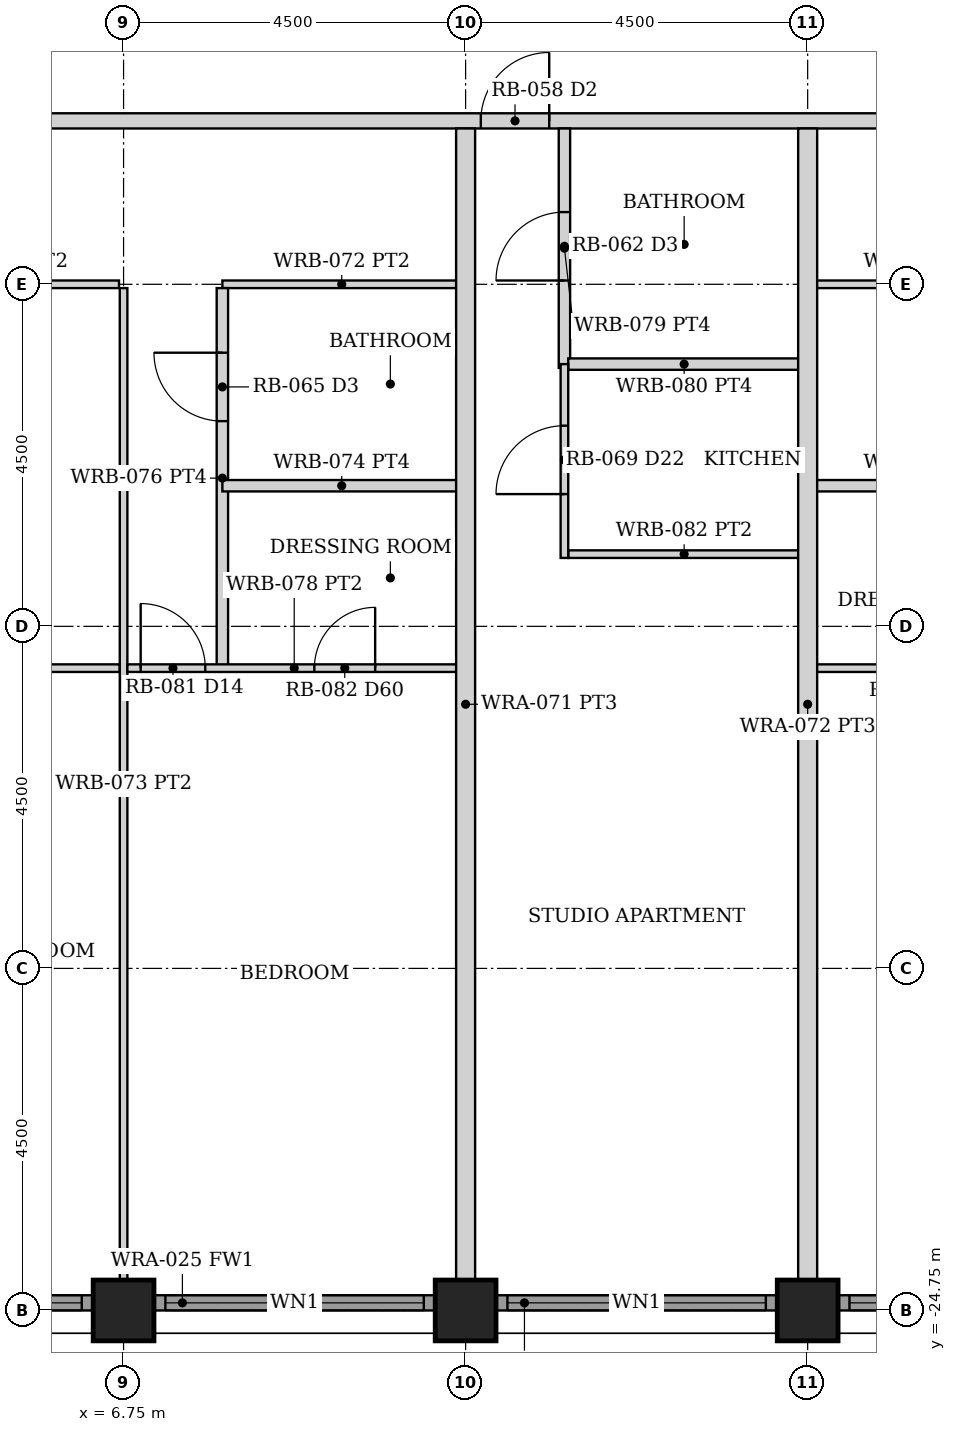
"""IFC4 building model, lengths in metres.
Left out: names, types, materials, properties, quantities, classifications, styles, units other than length and angle.
Written with IfcOpenShell. Run it as: python <this file> out.ifc"""

import sys

from ifc_helpers import new_model, si_unit, direction, frame, frame_2d, origin, origin_2d, place, context, subcontext, project, spatial, rectangle, hollow_rectangle, extrude, element, fill, save


model = new_model("IFC4")
c1 = context("Model", 3, precision=1e-05, world=origin(), true_north=direction((0.0, 1.0)))
c2 = subcontext(c1, "Body", "Model", "MODEL_VIEW")
j1 = project(units=[si_unit("LENGTHUNIT", "METRE"), si_unit("PLANEANGLEUNIT", "RADIAN")], contexts=[c1])
p1 = place(None, origin())
s1 = spatial("IfcSite", under=j1, at=p1, CompositionType="ELEMENT")
p2 = place(p1, origin())
s2 = spatial("IfcBuilding", under=s1, at=p2, CompositionType="ELEMENT")
p3 = place(p2, frame((0.0, 0.0, 37.0)))
s3 = spatial("IfcBuildingStorey", under=s2, at=p3, CompositionType="ELEMENT", Elevation=37.0)
for number, where, z_axis, x_axis in (
    (1, (6.75, -24.75, 0.0), (0.0, 0.0, 1.0), (0.0, 1.0, 0.0)),
    (2, (11.25, -24.75, 0.0), (0.0, 0.0, 1.0), (0.0, 1.0, 0.0)),
    (3, (15.75, -24.75, 0.0), (0.0, 0.0, 1.0), (0.0, 1.0, 0.0)),
):
    element("IfcColumn", number, at=place(p3, frame(where, z_axis=z_axis, x_axis=x_axis)), inside=s3, PredefinedType="COLUMN", context=c2, shape_type="SweptSolid", body=[
        extrude(hollow_rectangle(XDim=0.8, YDim=0.8, WallThickness=0.07, at=origin_2d()), origin(), (0.0, 0.0, 1.0), 3.5),
    ])
p4 = place(p3, frame((2.655, -24.65, 0.0), z_axis=(0.0, 0.0, 1.0), x_axis=(1.0, 0.0, 0.0)))
e4 = element("IfcWall", 4, at=p4, inside=s3, PredefinedType="SOLIDWALL", context=c2, shape_type="SweptSolid", body=[
    extrude(rectangle(XDim=3.69, YDim=0.2, at=frame_2d((1.845, 0.0))), origin(), (0.0, 0.0, 1.0), 2.379),
])
p5 = place(p4, frame((0.145, 0.0, 0.3)))
e5 = element("IfcOpeningElement", 5, at=p5, cuts=e4, PredefinedType="OPENING", context=c2, shape_type="SweptSolid", body=[
    extrude(rectangle(XDim=3.4, YDim=1.929, at=frame_2d((1.7, 0.964))), frame((0.0, 0.11, 0.0), z_axis=(0.0, -1.0, 0.0), x_axis=(1.0, 0.0, 0.0)), (0.0, 0.0, 1.0), 0.22),
])
p6 = place(p3, frame((7.155, -24.65, 0.0), z_axis=(0.0, 0.0, 1.0), x_axis=(1.0, 0.0, 0.0)))
e6 = element("IfcWall", 6, at=p6, inside=s3, PredefinedType="SOLIDWALL", context=c2, shape_type="SweptSolid", body=[
    extrude(rectangle(XDim=3.69, YDim=0.2, at=frame_2d((1.845, 0.0))), origin(), (0.0, 0.0, 1.0), 2.379),
])
p7 = place(p6, frame((0.145, 0.0, 0.3)))
e7 = element("IfcOpeningElement", 7, at=p7, cuts=e6, PredefinedType="OPENING", context=c2, shape_type="SweptSolid", body=[
    extrude(rectangle(XDim=3.4, YDim=1.929, at=frame_2d((1.7, 0.964))), frame((0.0, 0.11, 0.0), z_axis=(0.0, -1.0, 0.0), x_axis=(1.0, 0.0, 0.0)), (0.0, 0.0, 1.0), 0.22),
])
p8 = place(p3, frame((11.655, -24.65, 0.0), z_axis=(0.0, 0.0, 1.0), x_axis=(1.0, 0.0, 0.0)))
e8 = element("IfcWall", 8, at=p8, inside=s3, PredefinedType="SOLIDWALL", context=c2, shape_type="SweptSolid", body=[
    extrude(rectangle(XDim=3.69, YDim=0.2, at=frame_2d((1.845, 0.0))), origin(), (0.0, 0.0, 1.0), 2.379),
])
p9 = place(p8, frame((0.145, 0.0, 0.3)))
e9 = element("IfcOpeningElement", 9, at=p9, cuts=e8, PredefinedType="OPENING", context=c2, shape_type="SweptSolid", body=[
    extrude(rectangle(XDim=3.4, YDim=1.929, at=frame_2d((1.7, 0.964))), frame((0.0, 0.11, 0.0), z_axis=(0.0, -1.0, 0.0), x_axis=(1.0, 0.0, 0.0)), (0.0, 0.0, 1.0), 0.22),
])
p10 = place(p3, frame((16.155, -24.65, 0.0), z_axis=(0.0, 0.0, 1.0), x_axis=(1.0, 0.0, 0.0)))
e10 = element("IfcWall", 10, at=p10, inside=s3, PredefinedType="SOLIDWALL", context=c2, shape_type="SweptSolid", body=[
    extrude(rectangle(XDim=3.69, YDim=0.2, at=frame_2d((1.845, 0.0))), origin(), (0.0, 0.0, 1.0), 2.379),
])
p11 = place(p10, frame((0.145, 0.0, 0.3)))
e11 = element("IfcOpeningElement", 11, at=p11, cuts=e10, PredefinedType="OPENING", context=c2, shape_type="SweptSolid", body=[
    extrude(rectangle(XDim=3.4, YDim=1.929, at=frame_2d((1.7, 0.964))), frame((0.0, 0.11, 0.0), z_axis=(0.0, -1.0, 0.0), x_axis=(1.0, 0.0, 0.0)), (0.0, 0.0, 1.0), 0.22),
])
p12 = place(p3, frame((-24.55, -9.1, 0.0), z_axis=(0.0, 0.0, 1.0), x_axis=(1.0, 0.0, 0.0)))
e12 = element("IfcWall", 12, at=p12, inside=s3, PredefinedType="PARTITIONING", context=c2, shape_type="SweptSolid", body=[
    extrude(rectangle(XDim=49.1, YDim=0.2, at=frame_2d((24.55, 0.0))), origin(), (0.0, 0.0, 1.0), 2.373),
])
p13 = place(p12, frame((5.1, 0.0, 0.0)))
e13 = element("IfcOpeningElement", 13, at=p13, cuts=e12, PredefinedType="OPENING", context=c2, shape_type="SweptSolid", body=[
    extrude(rectangle(XDim=0.9, YDim=2.1, at=frame_2d((0.45, 1.05))), frame((0.0, 0.11, 0.0), z_axis=(0.0, -1.0, 0.0), x_axis=(1.0, 0.0, 0.0)), (0.0, 0.0, 1.0), 0.22),
])
p14 = place(p12, frame((9.0, 0.0, 0.0)))
e14 = element("IfcOpeningElement", 14, at=p14, cuts=e12, PredefinedType="OPENING", context=c2, shape_type="SweptSolid", body=[
    extrude(rectangle(XDim=0.9, YDim=2.1, at=frame_2d((0.45, 1.05))), frame((0.0, 0.11, 0.0), z_axis=(0.0, -1.0, 0.0), x_axis=(1.0, 0.0, 0.0)), (0.0, 0.0, 1.0), 0.22),
])
p15 = place(p12, frame((18.1, 0.0, 0.0)))
e15 = element("IfcOpeningElement", 15, at=p15, cuts=e12, PredefinedType="OPENING", context=c2, shape_type="SweptSolid", body=[
    extrude(rectangle(XDim=0.9, YDim=2.1, at=frame_2d((0.45, 1.05))), frame((0.0, 0.11, 0.0), z_axis=(0.0, -1.0, 0.0), x_axis=(1.0, 0.0, 0.0)), (0.0, 0.0, 1.0), 0.22),
])
p16 = place(p12, frame((22.5, 0.0, 0.0)))
e16 = element("IfcOpeningElement", 16, at=p16, cuts=e12, PredefinedType="OPENING", context=c2, shape_type="SweptSolid", body=[
    extrude(rectangle(XDim=0.9, YDim=2.1, at=frame_2d((0.45, 1.05))), frame((0.0, 0.11, 0.0), z_axis=(0.0, -1.0, 0.0), x_axis=(1.0, 0.0, 0.0)), (0.0, 0.0, 1.0), 0.22),
])
p17 = place(p12, frame((27.1, 0.0, 0.0)))
e17 = element("IfcOpeningElement", 17, at=p17, cuts=e12, PredefinedType="OPENING", context=c2, shape_type="SweptSolid", body=[
    extrude(rectangle(XDim=0.9, YDim=2.1, at=frame_2d((0.45, 1.05))), frame((0.0, 0.11, 0.0), z_axis=(0.0, -1.0, 0.0), x_axis=(1.0, 0.0, 0.0)), (0.0, 0.0, 1.0), 0.22),
])
p18 = place(p12, frame((36.0, 0.0, 0.0)))
e18 = element("IfcOpeningElement", 18, at=p18, cuts=e12, PredefinedType="OPENING", context=c2, shape_type="SweptSolid", body=[
    extrude(rectangle(XDim=0.9, YDim=2.1, at=frame_2d((0.45, 1.05))), frame((0.0, 0.11, 0.0), z_axis=(0.0, -1.0, 0.0), x_axis=(1.0, 0.0, 0.0)), (0.0, 0.0, 1.0), 0.22),
])
p19 = place(p12, frame((43.1, 0.0, 0.0)))
e19 = element("IfcOpeningElement", 19, at=p19, cuts=e12, PredefinedType="OPENING", context=c2, shape_type="SweptSolid", body=[
    extrude(rectangle(XDim=0.9, YDim=2.1, at=frame_2d((0.45, 1.05))), frame((0.0, 0.11, 0.0), z_axis=(0.0, -1.0, 0.0), x_axis=(1.0, 0.0, 0.0)), (0.0, 0.0, 1.0), 0.22),
])
p20 = place(p3, frame((3.55, -11.25, 0.0), z_axis=(0.0, 0.0, 1.0), x_axis=(1.0, 0.0, 0.0)))
e20 = element("IfcWall", 20, at=p20, inside=s3, PredefinedType="PARTITIONING", context=c2, shape_type="SweptSolid", body=[
    extrude(rectangle(XDim=3.14, YDim=0.1, at=frame_2d((1.57, 0.0))), origin(), (0.0, 0.0, 1.0), 2.373),
])
p21 = place(p3, frame((2.31, -16.3, 0.0), z_axis=(0.0, 0.0, 1.0), x_axis=(1.0, 0.0, 0.0)))
e21 = element("IfcWall", 21, at=p21, inside=s3, PredefinedType="PARTITIONING", context=c2, shape_type="SweptSolid", body=[
    extrude(rectangle(XDim=4.39, YDim=0.1, at=frame_2d((2.195, 0.0))), origin(), (0.0, 0.0, 1.0), 2.373),
])
p22 = place(p21, frame((0.14, 0.0, 0.0)))
e22 = element("IfcOpeningElement", 22, at=p22, cuts=e21, PredefinedType="OPENING", context=c2, shape_type="SweptSolid", body=[
    extrude(rectangle(XDim=0.9, YDim=2.1, at=frame_2d((0.45, 1.05))), frame((0.0, 0.06, 0.0), z_axis=(0.0, -1.0, 0.0), x_axis=(1.0, 0.0, 0.0)), (0.0, 0.0, 1.0), 0.12),
])
p23 = place(p3, frame((6.75, -24.35, 0.0), z_axis=(0.0, 0.0, 1.0), x_axis=(0.0, 1.0, 0.0)))
e23 = element("IfcWall", 23, at=p23, inside=s3, PredefinedType="PARTITIONING", context=c2, shape_type="SweptSolid", body=[
    extrude(rectangle(XDim=13.05, YDim=0.1, at=frame_2d((6.525, 0.0))), origin(), (0.0, 0.0, 1.0), 2.373),
])
p24 = place(p3, frame((8.05, -11.25, 0.0), z_axis=(0.0, 0.0, 1.0), x_axis=(1.0, 0.0, 0.0)))
e24 = element("IfcWall", 24, at=p24, inside=s3, PredefinedType="PARTITIONING", context=c2, shape_type="SweptSolid", body=[
    extrude(rectangle(XDim=3.14, YDim=0.1, at=frame_2d((1.57, 0.0))), origin(), (0.0, 0.0, 1.0), 2.373),
])
p25 = place(p3, frame((8.05, -16.3, 0.0), z_axis=(0.0, 0.0, 1.0), x_axis=(0.0, 1.0, 0.0)))
e25 = element("IfcWall", 25, at=p25, inside=s3, PredefinedType="PARTITIONING", context=c2, shape_type="SweptSolid", body=[
    extrude(rectangle(XDim=5.0, YDim=0.15, at=frame_2d((2.5, 0.0))), origin(), (0.0, 0.0, 1.0), 2.373),
])
p26 = place(p25, frame((3.25, 0.0, 0.0)))
e26 = element("IfcOpeningElement", 26, at=p26, cuts=e25, PredefinedType="OPENING", context=c2, shape_type="SweptSolid", body=[
    extrude(rectangle(XDim=0.9, YDim=2.1, at=frame_2d((0.45, 1.05))), frame((0.0, 0.085, 0.0), z_axis=(0.0, -1.0, 0.0), x_axis=(1.0, 0.0, 0.0)), (0.0, 0.0, 1.0), 0.17),
])
p27 = place(p3, frame((6.8, -16.3, 0.0), z_axis=(0.0, 0.0, 1.0), x_axis=(1.0, 0.0, 0.0)))
e27 = element("IfcWall", 27, at=p27, inside=s3, PredefinedType="PARTITIONING", context=c2, shape_type="SweptSolid", body=[
    extrude(rectangle(XDim=4.39, YDim=0.1, at=frame_2d((2.195, 0.0))), origin(), (0.0, 0.0, 1.0), 2.373),
])
p28 = place(p27, frame((0.175, 0.0, 0.0)))
e28 = element("IfcOpeningElement", 28, at=p28, cuts=e27, PredefinedType="OPENING", context=c2, shape_type="SweptSolid", body=[
    extrude(rectangle(XDim=0.85, YDim=2.1, at=frame_2d((0.425, 1.05))), frame((0.0, 0.06, 0.0), z_axis=(0.0, -1.0, 0.0), x_axis=(1.0, 0.0, 0.0)), (0.0, 0.0, 1.0), 0.12),
])
p29 = place(p27, frame((2.46, 0.0, 0.0)))
e29 = element("IfcOpeningElement", 29, at=p29, cuts=e27, PredefinedType="OPENING", context=c2, shape_type="SweptSolid", body=[
    extrude(rectangle(XDim=0.8, YDim=2.1, at=frame_2d((0.4, 1.05))), frame((0.0, 0.06, 0.0), z_axis=(0.0, -1.0, 0.0), x_axis=(1.0, 0.0, 0.0)), (0.0, 0.0, 1.0), 0.12),
])
p30 = place(p3, frame((8.05, -13.9, 0.0), z_axis=(0.0, 0.0, 1.0), x_axis=(1.0, 0.0, 0.0)))
e30 = element("IfcWall", 30, at=p30, inside=s3, PredefinedType="PARTITIONING", context=c2, shape_type="SweptSolid", body=[
    extrude(rectangle(XDim=3.14, YDim=0.15, at=frame_2d((1.57, 0.0))), origin(), (0.0, 0.0, 1.0), 2.373),
])
p31 = place(p3, frame((12.55, -12.35, 0.0), z_axis=(0.0, 0.0, 1.0), x_axis=(0.0, 1.0, 0.0)))
e31 = element("IfcWall", 31, at=p31, inside=s3, PredefinedType="PARTITIONING", context=c2, shape_type="SweptSolid", body=[
    extrude(rectangle(XDim=3.15, YDim=0.15, at=frame_2d((1.575, 0.0))), origin(), (0.0, 0.0, 1.0), 2.373),
])
p32 = place(p31, frame((1.15, 0.0, 0.0)))
e32 = element("IfcOpeningElement", 32, at=p32, cuts=e31, PredefinedType="OPENING", context=c2, shape_type="SweptSolid", body=[
    extrude(rectangle(XDim=0.9, YDim=2.1, at=frame_2d((0.45, 1.05))), frame((0.0, 0.085, 0.0), z_axis=(0.0, -1.0, 0.0), x_axis=(1.0, 0.0, 0.0)), (0.0, 0.0, 1.0), 0.17),
])
p33 = place(p3, frame((12.6, -12.3, 0.0), z_axis=(0.0, 0.0, 1.0), x_axis=(1.0, 0.0, 0.0)))
e33 = element("IfcWall", 33, at=p33, inside=s3, PredefinedType="PARTITIONING", context=c2, shape_type="SweptSolid", body=[
    extrude(rectangle(XDim=3.05, YDim=0.15, at=frame_2d((1.525, 0.0))), origin(), (0.0, 0.0, 1.0), 2.373),
])
p34 = place(p3, frame((12.6, -14.8, 0.0), z_axis=(0.0, 0.0, 1.0), x_axis=(1.0, 0.0, 0.0)))
e34 = element("IfcWall", 34, at=p34, inside=s3, PredefinedType="PARTITIONING", context=c2, shape_type="SweptSolid", body=[
    extrude(rectangle(XDim=3.05, YDim=0.1, at=frame_2d((1.525, 0.0))), origin(), (0.0, 0.0, 1.0), 2.373),
])
p35 = place(p3, frame((12.55, -14.85, 0.0), z_axis=(0.0, 0.0, 1.0), x_axis=(0.0, 1.0, 0.0)))
e35 = element("IfcWall", 35, at=p35, inside=s3, PredefinedType="PARTITIONING", context=c2, shape_type="SweptSolid", body=[
    extrude(rectangle(XDim=2.55, YDim=0.1, at=frame_2d((1.275, 0.0))), origin(), (0.0, 0.0, 1.0), 2.373),
])
p36 = place(p35, frame((0.84, 0.0, 0.0)))
e36 = element("IfcOpeningElement", 36, at=p36, cuts=e35, PredefinedType="OPENING", context=c2, shape_type="SweptSolid", body=[
    extrude(rectangle(XDim=0.9, YDim=2.1, at=frame_2d((0.45, 1.05))), frame((0.0, 0.06, 0.0), z_axis=(0.0, -1.0, 0.0), x_axis=(1.0, 0.0, 0.0)), (0.0, 0.0, 1.0), 0.12),
])
p37 = place(p3, frame((15.81, -11.25, 0.0), z_axis=(0.0, 0.0, 1.0), x_axis=(1.0, 0.0, 0.0)))
e37 = element("IfcWall", 37, at=p37, inside=s3, PredefinedType="PARTITIONING", context=c2, shape_type="SweptSolid", body=[
    extrude(rectangle(XDim=3.14, YDim=0.1, at=frame_2d((1.57, 0.0))), origin(), (0.0, 0.0, 1.0), 2.373),
])
p38 = place(p3, frame((15.81, -16.3, 0.0), z_axis=(0.0, 0.0, 1.0), x_axis=(1.0, 0.0, 0.0)))
e38 = element("IfcWall", 38, at=p38, inside=s3, PredefinedType="PARTITIONING", context=c2, shape_type="SweptSolid", body=[
    extrude(rectangle(XDim=4.39, YDim=0.1, at=frame_2d((2.195, 0.0))), origin(), (0.0, 0.0, 1.0), 2.373),
])
p39 = place(p38, frame((3.365, 0.0, 0.0)))
e39 = element("IfcOpeningElement", 39, at=p39, cuts=e38, PredefinedType="OPENING", context=c2, shape_type="SweptSolid", body=[
    extrude(rectangle(XDim=0.85, YDim=2.1, at=frame_2d((0.425, 1.05))), frame((0.0, 0.06, 0.0), z_axis=(0.0, -1.0, 0.0), x_axis=(1.0, 0.0, 0.0)), (0.0, 0.0, 1.0), 0.12),
])
p40 = place(p38, frame((1.13, 0.0, 0.0)))
e40 = element("IfcOpeningElement", 40, at=p40, cuts=e38, PredefinedType="OPENING", context=c2, shape_type="SweptSolid", body=[
    extrude(rectangle(XDim=0.8, YDim=2.1, at=frame_2d((0.4, 1.05))), frame((0.0, 0.06, 0.0), z_axis=(0.0, -1.0, 0.0), x_axis=(1.0, 0.0, 0.0)), (0.0, 0.0, 1.0), 0.12),
])
p41 = place(p3, frame((15.81, -13.9, 0.0), z_axis=(0.0, 0.0, 1.0), x_axis=(1.0, 0.0, 0.0)))
e41 = element("IfcWall", 41, at=p41, inside=s3, PredefinedType="PARTITIONING", context=c2, shape_type="SweptSolid", body=[
    extrude(rectangle(XDim=3.14, YDim=0.15, at=frame_2d((1.57, 0.0))), origin(), (0.0, 0.0, 1.0), 2.373),
])
for number, where, z_axis, x_axis in (
    (42, (11.25, -24.35, 0.0), (0.0, 0.0, 1.0), (0.0, 1.0, 0.0)),
    (43, (15.75, -24.35, 0.0), (0.0, 0.0, 1.0), (0.0, 1.0, 0.0)),
):
    element("IfcWall", number, at=place(p3, frame(where, z_axis=z_axis, x_axis=x_axis)), inside=s3, PredefinedType="PARTITIONING", context=c2, shape_type="SweptSolid", body=[
        extrude(rectangle(XDim=15.15, YDim=0.25, at=frame_2d((7.575, 0.0))), origin(), (0.0, 0.0, 1.0), 2.373),
    ])
p42 = place(p5, origin())
e44 = element("IfcWindow", 44, at=p42, inside=s3, PartitioningType="SINGLE_PANEL", PredefinedType="WINDOW", context=c2, shape_type="SweptSolid", body=[
    extrude(rectangle(XDim=3.4, YDim=1.929, at=frame_2d((1.7, 0.964))), frame((0.0, 0.03, 0.0), z_axis=(0.0, -1.0, 0.0), x_axis=(1.0, 0.0, 0.0)), (0.0, 0.0, 1.0), 0.06),
])
fill(e5, e44)
p43 = place(p7, origin())
e45 = element("IfcWindow", 45, at=p43, inside=s3, PartitioningType="SINGLE_PANEL", PredefinedType="WINDOW", context=c2, shape_type="SweptSolid", body=[
    extrude(rectangle(XDim=3.4, YDim=1.929, at=frame_2d((1.7, 0.964))), frame((0.0, 0.03, 0.0), z_axis=(0.0, -1.0, 0.0), x_axis=(1.0, 0.0, 0.0)), (0.0, 0.0, 1.0), 0.06),
])
fill(e7, e45)
p44 = place(p9, origin())
e46 = element("IfcWindow", 46, at=p44, inside=s3, PartitioningType="SINGLE_PANEL", PredefinedType="WINDOW", context=c2, shape_type="SweptSolid", body=[
    extrude(rectangle(XDim=3.4, YDim=1.929, at=frame_2d((1.7, 0.964))), frame((0.0, 0.03, 0.0), z_axis=(0.0, -1.0, 0.0), x_axis=(1.0, 0.0, 0.0)), (0.0, 0.0, 1.0), 0.06),
])
fill(e9, e46)
p45 = place(p11, origin())
e47 = element("IfcWindow", 47, at=p45, inside=s3, PartitioningType="SINGLE_PANEL", PredefinedType="WINDOW", context=c2, shape_type="SweptSolid", body=[
    extrude(rectangle(XDim=3.4, YDim=1.929, at=frame_2d((1.7, 0.964))), frame((0.0, 0.03, 0.0), z_axis=(0.0, -1.0, 0.0), x_axis=(1.0, 0.0, 0.0)), (0.0, 0.0, 1.0), 0.06),
])
fill(e11, e47)
p46 = place(p28, origin())
e48 = element("IfcDoor", 48, at=p46, inside=s3, OperationType="SINGLE_SWING_LEFT", PredefinedType="DOOR", context=c2, shape_type="SweptSolid", body=[
    extrude(rectangle(XDim=0.85, YDim=2.1, at=frame_2d((0.425, 1.05))), frame((0.0, 0.025, 0.0), z_axis=(0.0, -1.0, 0.0), x_axis=(1.0, 0.0, 0.0)), (0.0, 0.0, 1.0), 0.05),
])
fill(e28, e48)
p47 = place(p26, origin())
e49 = element("IfcDoor", 49, at=p47, inside=s3, OperationType="SINGLE_SWING_RIGHT", PredefinedType="DOOR", context=c2, shape_type="SweptSolid", body=[
    extrude(rectangle(XDim=0.9, YDim=2.1, at=frame_2d((0.45, 1.05))), frame((0.0, 0.025, 0.0), z_axis=(0.0, -1.0, 0.0), x_axis=(1.0, 0.0, 0.0)), (0.0, 0.0, 1.0), 0.05),
])
fill(e26, e49)
p48 = place(p29, origin())
e50 = element("IfcDoor", 50, at=p48, inside=s3, OperationType="SINGLE_SWING_RIGHT", PredefinedType="DOOR", context=c2, shape_type="SweptSolid", body=[
    extrude(rectangle(XDim=0.8, YDim=2.1, at=frame_2d((0.4, 1.05))), frame((0.0, 0.025, 0.0), z_axis=(0.0, -1.0, 0.0), x_axis=(1.0, 0.0, 0.0)), (0.0, 0.0, 1.0), 0.05),
])
fill(e29, e50)
p49 = place(p18, origin())
e51 = element("IfcDoor", 51, at=p49, inside=s3, OperationType="SINGLE_SWING_RIGHT", PredefinedType="DOOR", context=c2, shape_type="SweptSolid", body=[
    extrude(rectangle(XDim=0.9, YDim=2.1, at=frame_2d((0.45, 1.05))), frame((0.0, 0.025, 0.0), z_axis=(0.0, -1.0, 0.0), x_axis=(1.0, 0.0, 0.0)), (0.0, 0.0, 1.0), 0.05),
])
fill(e18, e51)
p50 = place(p32, origin())
e52 = element("IfcDoor", 52, at=p50, inside=s3, OperationType="SINGLE_SWING_LEFT", PredefinedType="DOOR", context=c2, shape_type="SweptSolid", body=[
    extrude(rectangle(XDim=0.9, YDim=2.1, at=frame_2d((0.45, 1.05))), frame((0.0, 0.025, 0.0), z_axis=(0.0, -1.0, 0.0), x_axis=(1.0, 0.0, 0.0)), (0.0, 0.0, 1.0), 0.05),
])
fill(e32, e52)
p51 = place(p36, origin())
e53 = element("IfcDoor", 53, at=p51, inside=s3, OperationType="SINGLE_SWING_LEFT", PredefinedType="DOOR", context=c2, shape_type="SweptSolid", body=[
    extrude(rectangle(XDim=0.9, YDim=2.1, at=frame_2d((0.45, 1.05))), frame((0.0, 0.025, 0.0), z_axis=(0.0, -1.0, 0.0), x_axis=(1.0, 0.0, 0.0)), (0.0, 0.0, 1.0), 0.05),
])
fill(e36, e53)
save(model, sys.argv[1])
